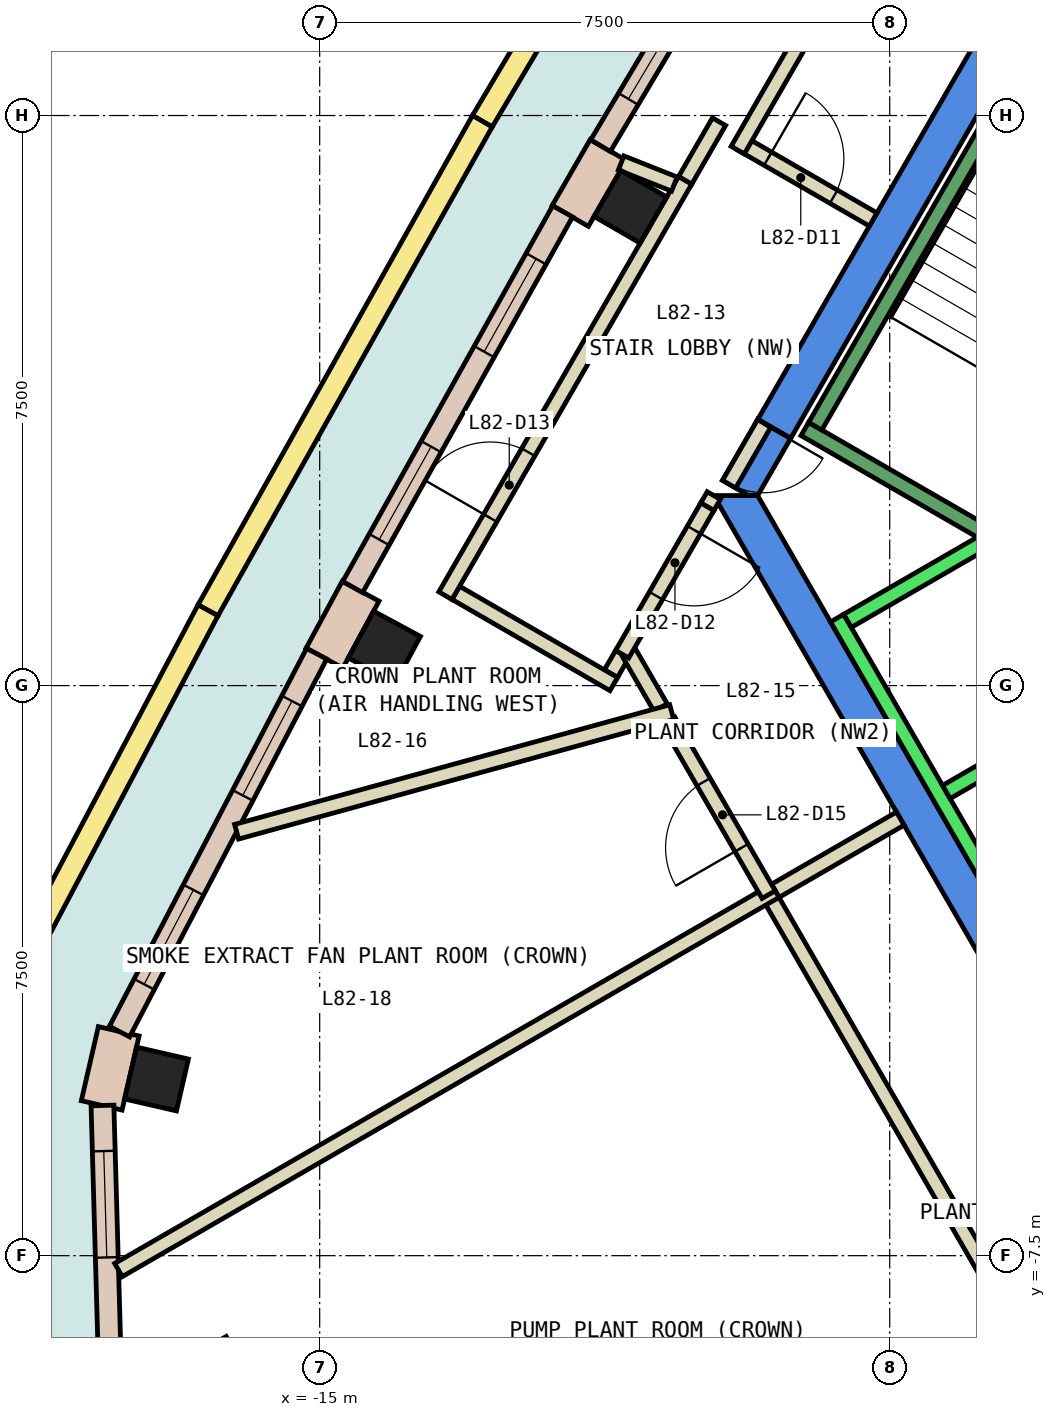
"""IFC4 building model, lengths in metres.
Left out: names, types, materials, properties, quantities, classifications, styles, units other than length and angle.
Written with IfcOpenShell. Run it as: python <this file> out.ifc"""

import sys

from ifc_helpers import new_model, si_unit, direction, frame, frame_2d, origin, origin_2d, place, context, subcontext, project, spatial, polyline, rectangle, outline, extrude, element, fill, save


model = new_model("IFC4")
c1 = context("Model", 3, precision=1e-05, world=origin(), true_north=direction((0.0, 1.0)))
c2 = subcontext(c1, "Body", "Model", "MODEL_VIEW")
j1 = project(units=[si_unit("LENGTHUNIT", "METRE"), si_unit("PLANEANGLEUNIT", "RADIAN")], contexts=[c1])
p1 = place(None, origin())
s1 = spatial("IfcSite", under=j1, at=p1, CompositionType="ELEMENT")
p2 = place(p1, origin())
s2 = spatial("IfcBuilding", under=s1, at=p2, CompositionType="ELEMENT")
p3 = place(p2, frame((0.0, 0.0, 349.4)))
s3 = spatial("IfcBuildingStorey", under=s2, at=p3, CompositionType="ELEMENT", Elevation=349.4)
for number, where, z_axis, x_axis in (
    (1, (-10.912, 6.3, 0.0), (0.0, 0.0, 1.0), (0.5, 0.866, 0.0)),
    (2, (-14.149, 0.505, 0.0), (0.0, 0.0, 1.0), (0.475, 0.88, 0.0)),
    (3, (-17.147, -5.176, 0.0), (0.0, 0.0, 1.0), (0.224, 0.974, 0.0)),
):
    element("IfcColumn", number, at=place(p3, frame(where, z_axis=z_axis, x_axis=x_axis)), inside=s3, PredefinedType="COLUMN", context=c2, shape_type="SweptSolid", body=[
        extrude(rectangle(XDim=0.7, YDim=0.7, at=origin_2d()), origin(), (0.0, 0.0, 1.0), 4.15),
    ])
p4 = place(p3, frame((-16.486, -9.519, 0.0), z_axis=(0.0, 0.0, 1.0), x_axis=(0.866025403784, 0.5, 0.0)))
e4 = element("IfcColumn", 4, at=p4, inside=s3, PredefinedType="COLUMN", context=c2, shape_type="SweptSolid", body=[
    extrude(rectangle(XDim=1.4, YDim=1.4, at=origin_2d()), origin(), (0.0, 0.0, 1.0), 4.15),
])
p5 = place(p3, frame((0.0, 0.0, -0.45)))
e5 = element("IfcWall", 5, at=p5, inside=s3, PredefinedType="SHEAR", context=c2, shape_type="SweptSolid", body=[
    extrude(outline(polyline([(-9.236, 3.502), (-8.803, 3.253), (-4.619, 10.5), (-4.907, 11.0), (-9.236, 3.502)])), origin(), (0.0, 0.0, 1.0), 4.6),
])
p6 = place(p3, frame((0.0, 0.0, 3.6)))
e6 = element("IfcWall", 6, at=p6, inside=s3, PredefinedType="SHEAR", context=c2, shape_type="SweptSolid", body=[
    extrude(outline(polyline([(-9.7, 2.7), (-9.354, 2.5), (-9.238, 2.5), (-8.803, 3.253), (-9.236, 3.502), (-9.7, 2.7)])), origin(), (0.0, 0.0, 1.0), 0.55),
])
p7 = place(p3, frame((0.0, 0.0, -0.45)))
e7 = element("IfcWall", 7, at=p7, inside=s3, PredefinedType="SHEAR", context=c2, shape_type="SweptSolid", body=[
    extrude(outline(polyline([(-9.815, 2.5), (-4.907, -6.0), (-4.619, -5.5), (-9.238, 2.5), (-9.815, 2.5)])), origin(), (0.0, 0.0, 1.0), 4.6),
])
p8 = place(p3, frame((-11.203, 7.046, 0.0), z_axis=(0.0, 0.0, 1.0), x_axis=(-0.49960277677, -0.866254619292, 0.0)))
e8 = element("IfcWall", 8, at=p8, inside=s3, PredefinedType="STANDARD", context=c2, shape_type="SweptSolid", body=[
    extrude(rectangle(XDim=1.001, YDim=0.55, at=frame_2d((0.5, 0.0))), origin(), (0.0, 0.0, 1.0), 4.15),
])
p9 = place(p3, frame((-14.461, 1.242, 0.0), z_axis=(0.0, 0.0, 1.0), x_axis=(-0.475874292304, -0.879513307417, 0.0)))
e9 = element("IfcWall", 9, at=p9, inside=s3, PredefinedType="STANDARD", context=c2, shape_type="SweptSolid", body=[
    extrude(rectangle(XDim=1.0, YDim=0.55, at=frame_2d((0.5, 0.0))), origin(), (0.0, 0.0, 1.0), 4.15),
])
p10 = place(p3, frame((-17.644, -4.548, 0.0), z_axis=(0.0, 0.0, 1.0), x_axis=(-0.223825449309, -0.974629246556, 0.0)))
e10 = element("IfcWall", 10, at=p10, inside=s3, PredefinedType="STANDARD", context=c2, shape_type="SweptSolid", body=[
    extrude(rectangle(XDim=1.0, YDim=0.55, at=frame_2d((0.5, 0.0))), origin(), (0.0, 0.0, 1.0), 4.15),
])
p11 = place(p3, frame((-8.406, 11.966, 0.0), z_axis=(0.0, 0.0, 1.0), x_axis=(-0.512115331419, -0.858916694055, 0.0)))
e11 = element("IfcWall", 11, at=p11, inside=s3, PredefinedType="STANDARD", context=c2, shape_type="SweptSolid", body=[
    extrude(rectangle(XDim=5.661, YDim=0.3, at=frame_2d((2.83, 0.0))), origin(), (0.0, 0.0, 1.0), 4.15),
])
p12 = place(p11, frame((0.415, 0.0, 0.0)))
e12 = element("IfcOpeningElement", 12, at=p12, cuts=e11, PredefinedType="OPENING", context=c2, shape_type="SweptSolid", body=[
    extrude(rectangle(XDim=2.0, YDim=2.4, at=frame_2d((1.0, 1.2))), frame((0.0, 0.16, 0.0), z_axis=(0.0, -1.0, 0.0), x_axis=(1.0, 0.0, 0.0)), (0.0, 0.0, 1.0), 0.32),
])
p13 = place(p11, frame((3.546, 0.0, 0.9)))
e13 = element("IfcOpeningElement", 13, at=p13, cuts=e11, PredefinedType="OPENING", context=c2, shape_type="SweptSolid", body=[
    extrude(rectangle(XDim=1.4, YDim=3.0, at=frame_2d((0.7, 1.5))), frame((0.0, 0.16, 0.0), z_axis=(0.0, -1.0, 0.0), x_axis=(1.0, 0.0, 0.0)), (0.0, 0.0, 1.0), 0.32),
])
p14 = place(p3, frame((-11.804, 6.239, 0.0), z_axis=(0.0, 0.0, 1.0), x_axis=(-0.487863884296, -0.872919715896, 0.0)))
e14 = element("IfcWall", 14, at=p14, inside=s3, PredefinedType="STANDARD", context=c2, shape_type="SweptSolid", body=[
    extrude(rectangle(XDim=5.661, YDim=0.3, at=frame_2d((2.831, 0.0))), origin(), (0.0, 0.0, 1.0), 4.15),
])
p15 = place(p14, frame((0.715, 0.0, 0.9)))
e15 = element("IfcOpeningElement", 15, at=p15, cuts=e14, PredefinedType="OPENING", context=c2, shape_type="SweptSolid", body=[
    extrude(rectangle(XDim=1.4, YDim=3.0, at=frame_2d((0.7, 1.5))), frame((0.0, 0.16, 0.0), z_axis=(0.0, -1.0, 0.0), x_axis=(1.0, 0.0, 0.0)), (0.0, 0.0, 1.0), 0.32),
])
p16 = place(p14, frame((3.546, 0.0, 0.9)))
e16 = element("IfcOpeningElement", 16, at=p16, cuts=e14, PredefinedType="OPENING", context=c2, shape_type="SweptSolid", body=[
    extrude(rectangle(XDim=1.4, YDim=3.0, at=frame_2d((0.7, 1.5))), frame((0.0, 0.16, 0.0), z_axis=(0.0, -1.0, 0.0), x_axis=(1.0, 0.0, 0.0)), (0.0, 0.0, 1.0), 0.32),
])
p17 = place(p3, frame((-15.04, 0.419, 0.0), z_axis=(0.0, 0.0, 1.0), x_axis=(-0.462629991654, -0.886551459771, 0.0)))
e17 = element("IfcWall", 17, at=p17, inside=s3, PredefinedType="STANDARD", context=c2, shape_type="SweptSolid", body=[
    extrude(rectangle(XDim=5.607, YDim=0.3, at=frame_2d((2.804, 0.0))), origin(), (0.0, 0.0, 1.0), 4.15),
])
p18 = place(p17, frame((0.702, 0.0, 0.9)))
e18 = element("IfcOpeningElement", 18, at=p18, cuts=e17, PredefinedType="OPENING", context=c2, shape_type="SweptSolid", body=[
    extrude(rectangle(XDim=1.4, YDim=3.0, at=frame_2d((0.7, 1.5))), frame((0.0, 0.16, 0.0), z_axis=(0.0, -1.0, 0.0), x_axis=(1.0, 0.0, 0.0)), (0.0, 0.0, 1.0), 0.32),
])
p19 = place(p17, frame((3.505, 0.0, 0.9)))
e19 = element("IfcOpeningElement", 19, at=p19, cuts=e17, PredefinedType="OPENING", context=c2, shape_type="SweptSolid", body=[
    extrude(rectangle(XDim=1.4, YDim=3.0, at=frame_2d((0.7, 1.5))), frame((0.0, 0.16, 0.0), z_axis=(0.0, -1.0, 0.0), x_axis=(1.0, 0.0, 0.0)), (0.0, 0.0, 1.0), 0.32),
])
p20 = place(p3, frame((-17.858, -5.524, 0.0), z_axis=(0.0, 0.0, 1.0), x_axis=(0.028453984805, -0.999595103404, 0.0)))
e20 = element("IfcWall", 20, at=p20, inside=s3, PredefinedType="STANDARD", context=c2, shape_type="SweptSolid", body=[
    extrude(rectangle(XDim=3.689, YDim=0.3, at=frame_2d((1.845, 0.0))), origin(), (0.0, 0.0, 1.0), 4.15),
])
p21 = place(p20, frame((0.6, 0.0, 0.9)))
e21 = element("IfcOpeningElement", 21, at=p21, cuts=e20, PredefinedType="OPENING", context=c2, shape_type="SweptSolid", body=[
    extrude(rectangle(XDim=1.4, YDim=3.0, at=frame_2d((0.7, 1.5))), frame((0.0, 0.16, 0.0), z_axis=(0.0, -1.0, 0.0), x_axis=(1.0, 0.0, 0.0)), (0.0, 0.0, 1.0), 0.32),
])
p22 = place(p3, origin())
e22 = element("IfcWall", 22, at=p22, inside=s3, PredefinedType="PARAPET", context=c2, shape_type="SweptSolid", body=[
    extrude(outline(polyline([(-9.22, 13.846), (-12.99, 7.5), (-12.73, 7.35), (-8.964, 13.69), (-9.22, 13.846)])), origin(), (0.0, 0.0, 1.0), 1.1),
])
p23 = place(p3, origin())
e23 = element("IfcWall", 23, at=p23, inside=s3, PredefinedType="PARAPET", context=c2, shape_type="SweptSolid", body=[
    extrude(outline(polyline([(-12.99, 7.5), (-16.601, 1.062), (-16.338, 0.919), (-12.73, 7.35), (-12.99, 7.5)])), origin(), (0.0, 0.0, 1.0), 1.1),
])
p24 = place(p3, origin())
e24 = element("IfcWall", 24, at=p24, inside=s3, PredefinedType="PARAPET", context=c2, shape_type="SweptSolid", body=[
    extrude(outline(polyline([(-16.601, 1.062), (-20.049, -5.465), (-19.747, -5.536), (-16.338, 0.919), (-16.601, 1.062)])), origin(), (0.0, 0.0, 1.0), 1.1),
])
p25 = place(p3, frame((-6.112, -7.913, 0.0), z_axis=(0.0, 0.0, 1.0), x_axis=(-0.500006035293, 0.866021919278, 0.0)))
e25 = element("IfcWall", 25, at=p25, inside=s3, PredefinedType="PARTITIONING", context=c2, shape_type="SweptSolid", body=[
    extrude(rectangle(XDim=5.962, YDim=0.2, at=frame_2d((2.981, 0.0))), origin(), (0.0, 0.0, 1.0), 4.15),
])
p26 = place(p3, frame((-9.006, -2.7, 0.0), z_axis=(0.0, 0.0, 1.0), x_axis=(0.865980106173, 0.500078449558, 0.0)))
e26 = element("IfcWall", 26, at=p26, inside=s3, PredefinedType="PARTITIONING", context=c2, shape_type="SweptSolid", body=[
    extrude(rectangle(XDim=1.9, YDim=0.2, at=frame_2d((0.95, 0.0))), origin(), (0.0, 0.0, 1.0), 4.15),
])
p27 = place(p3, frame((-17.647, -7.689, 0.0), z_axis=(0.0, 0.0, 1.0), x_axis=(0.866016483303, 0.500015450408, 0.0)))
e27 = element("IfcWall", 27, at=p27, inside=s3, PredefinedType="PARTITIONING", context=c2, shape_type="SweptSolid", body=[
    extrude(rectangle(XDim=9.978, YDim=0.2, at=frame_2d((4.989, 0.0))), origin(), (0.0, 0.0, 1.0), 4.15),
])
p28 = place(p3, frame((-9.45, 7.132, 0.0), z_axis=(0.0, 0.0, 1.0), x_axis=(0.866010750942, -0.50002537861, 0.0)))
e28 = element("IfcWall", 28, at=p28, inside=s3, PredefinedType="PARTITIONING", context=c2, shape_type="SweptSolid", body=[
    extrude(rectangle(XDim=2.0, YDim=0.2, at=frame_2d((1.0, 0.0))), origin(), (0.0, 0.0, 1.0), 4.15),
])
p29 = place(p28, frame((0.4, 0.0, 0.0)))
e29 = element("IfcOpeningElement", 29, at=p29, cuts=e28, PredefinedType="OPENING", context=c2, shape_type="SweptSolid", body=[
    extrude(rectangle(XDim=1.0, YDim=2.1, at=frame_2d((0.5, 1.05))), frame((0.0, 0.11, 0.0), z_axis=(0.0, -1.0, 0.0), x_axis=(1.0, 0.0, 0.0)), (0.0, 0.0, 1.0), 0.22),
])
p30 = place(p3, frame((-9.815, 2.5, 0.0), z_axis=(0.0, 0.0, 1.0), x_axis=(-0.5004692653, -0.865754303766, 0.0)))
e30 = element("IfcWall", 30, at=p30, inside=s3, PredefinedType="PARTITIONING", context=c2, shape_type="SweptSolid", body=[
    extrude(rectangle(XDim=0.17, YDim=0.2, at=frame_2d((0.085, 0.0))), origin(), (0.0, 0.0, 1.0), 2.4),
])
p31 = place(p3, frame((-11.02, 0.413, 0.0), z_axis=(0.0, 0.0, 1.0), x_axis=(-0.500222587251, -0.865896854829, 0.0)))
e31 = element("IfcWall", 31, at=p31, inside=s3, PredefinedType="PARTITIONING", context=c2, shape_type="SweptSolid", body=[
    extrude(rectangle(XDim=0.296, YDim=0.2, at=frame_2d((0.148, 0.0))), origin(), (0.0, 0.0, 1.0), 4.15),
])
p32 = place(p3, frame((-11.131, 0.02, 0.0), z_axis=(0.0, 0.0, 1.0), x_axis=(-0.865973769406, 0.500089422704, 0.0)))
e32 = element("IfcWall", 32, at=p32, inside=s3, PredefinedType="PARTITIONING", context=c2, shape_type="SweptSolid", body=[
    extrude(rectangle(XDim=2.399, YDim=0.2, at=frame_2d((1.2, 0.0))), origin(), (0.0, 0.0, 1.0), 4.15),
])
p33 = place(p3, frame((-13.346, 1.183, 0.0), z_axis=(0.0, 0.0, 1.0), x_axis=(0.49998814853, 0.866032246126, 0.0)))
e33 = element("IfcWall", 33, at=p33, inside=s3, PredefinedType="PARTITIONING", context=c2, shape_type="SweptSolid", body=[
    extrude(rectangle(XDim=6.31, YDim=0.2, at=frame_2d((3.155, 0.0))), origin(), (0.0, 0.0, 1.0), 4.15),
])
p34 = place(p33, frame((1.18, 0.0, 0.0)))
e34 = element("IfcOpeningElement", 34, at=p34, cuts=e33, PredefinedType="OPENING", context=c2, shape_type="SweptSolid", body=[
    extrude(rectangle(XDim=1.0, YDim=2.1, at=frame_2d((0.5, 1.05))), frame((0.0, 0.11, 0.0), z_axis=(0.0, -1.0, 0.0), x_axis=(1.0, 0.0, 0.0)), (0.0, 0.0, 1.0), 0.22),
])
p35 = place(p3, frame((-10.191, 6.648, 0.0), z_axis=(0.0, 0.0, 1.0), x_axis=(0.49973828311, 0.866176453382, 0.0)))
e35 = element("IfcWall", 35, at=p35, inside=s3, PredefinedType="PARTITIONING", context=c2, shape_type="SweptSolid", body=[
    extrude(rectangle(XDim=0.89, YDim=0.2, at=frame_2d((0.445, 0.0))), origin(), (0.0, 0.0, 1.0), 4.15),
])
p36 = place(p3, frame((-9.5, 7.045, 0.0), z_axis=(0.0, 0.0, 1.0), x_axis=(0.499966812698, 0.866044563634, 0.0)))
e36 = element("IfcWall", 36, at=p36, inside=s3, PredefinedType="PARTITIONING", context=c2, shape_type="SweptSolid", body=[
    extrude(rectangle(XDim=6.977, YDim=0.2, at=frame_2d((3.488, 0.0))), origin(), (0.0, 0.0, 1.0), 4.15),
])
p37 = place(p3, frame((-10.514, -0.289, 0.0), z_axis=(0.0, 0.0, 1.0), x_axis=(-0.500402557727, 0.865792862191, 0.0)))
e37 = element("IfcWall", 37, at=p37, inside=s3, PredefinedType="PARTITIONING", context=c2, shape_type="SweptSolid", body=[
    extrude(rectangle(XDim=0.911, YDim=0.2, at=frame_2d((0.456, 0.0))), origin(), (0.0, 0.0, 1.0), 4.15),
])
p38 = place(p3, frame((-9.093, -2.75, 0.0), z_axis=(0.0, 0.0, 1.0), x_axis=(-0.50016517285, 0.865930020191, 0.0)))
e38 = element("IfcWall", 38, at=p38, inside=s3, PredefinedType="PARTITIONING", context=c2, shape_type="SweptSolid", body=[
    extrude(rectangle(XDim=2.641, YDim=0.2, at=frame_2d((1.321, 0.0))), origin(), (0.0, 0.0, 1.0), 4.15),
])
p39 = place(p38, frame((0.712, 0.0, 0.0)))
e39 = element("IfcOpeningElement", 39, at=p39, cuts=e38, PredefinedType="OPENING", context=c2, shape_type="SweptSolid", body=[
    extrude(rectangle(XDim=1.0, YDim=2.1, at=frame_2d((0.5, 1.05))), frame((0.0, 0.11, 0.0), z_axis=(0.0, -1.0, 0.0), x_axis=(1.0, 0.0, 0.0)), (0.0, 0.0, 1.0), 0.22),
])
p40 = place(p3, frame((-11.034, 6.876, 0.0), z_axis=(0.0, 0.0, 1.0), x_axis=(0.929345991637, -0.369210005049, 0.0)))
e40 = element("IfcWall", 40, at=p40, inside=s3, PredefinedType="PARTITIONING", context=c2, shape_type="SweptSolid", body=[
    extrude(rectangle(XDim=0.753, YDim=0.2, at=frame_2d((0.376, 0.0))), origin(), (0.0, 0.0, 1.0), 4.15),
])
p41 = place(p3, frame((-10.368, -0.349, 0.0), z_axis=(0.0, 0.0, 1.0), x_axis=(-0.964223787392, -0.265089584534, 0.0)))
e41 = element("IfcWall", 41, at=p41, inside=s3, PredefinedType="PARTITIONING", context=c2, shape_type="SweptSolid", body=[
    extrude(rectangle(XDim=5.938, YDim=0.2, at=frame_2d((2.969, 0.0))), origin(), (0.0, 0.0, 1.0), 4.15),
])
p42 = place(p3, frame((-9.15, 3.452, 0.0), z_axis=(0.0, 0.0, 1.0), x_axis=(-0.500079945886, -0.865979242085, 0.0)))
e42 = element("IfcWall", 42, at=p42, inside=s3, PredefinedType="PARTITIONING", context=c2, shape_type="SweptSolid", body=[
    extrude(rectangle(XDim=0.926, YDim=0.2, at=frame_2d((0.463, 0.0))), origin(), (0.0, 0.0, 1.0), 2.4),
])
p43 = place(p42, frame((0.017, 0.0, 0.0)))
e43 = element("IfcOpeningElement", 43, at=p43, cuts=e42, PredefinedType="OPENING", context=c2, shape_type="SweptSolid", body=[
    extrude(rectangle(XDim=0.9, YDim=2.1, at=frame_2d((0.45, 1.05))), frame((0.0, 0.11, 0.0), z_axis=(0.0, -1.0, 0.0), x_axis=(1.0, 0.0, 0.0)), (0.0, 0.0, 1.0), 0.22),
])
p44 = place(p3, frame((-9.9, 2.353, 0.0), z_axis=(0.0, 0.0, 1.0), x_axis=(-0.500030632641, -0.866007717299, 0.0)))
e44 = element("IfcWall", 44, at=p44, inside=s3, PredefinedType="PARTITIONING", context=c2, shape_type="SweptSolid", body=[
    extrude(rectangle(XDim=2.24, YDim=0.2, at=frame_2d((1.12, 0.0))), origin(), (0.0, 0.0, 1.0), 4.15),
])
p45 = place(p44, frame((0.351, 0.0, 0.0)))
e45 = element("IfcOpeningElement", 45, at=p45, cuts=e44, PredefinedType="OPENING", context=c2, shape_type="SweptSolid", body=[
    extrude(rectangle(XDim=1.0, YDim=2.1, at=frame_2d((0.5, 1.05))), frame((0.0, 0.11, 0.0), z_axis=(0.0, -1.0, 0.0), x_axis=(1.0, 0.0, 0.0)), (0.0, 0.0, 1.0), 0.22),
])
p46 = place(p3, frame((-8.192, 0.888, 0.0), z_axis=(0.0, 0.0, 1.0), x_axis=(0.500034260056, -0.866005622828, 0.0)))
e46 = element("IfcWall", 46, at=p46, inside=s3, PredefinedType="STANDARD", context=c2, shape_type="SweptSolid", body=[
    extrude(rectangle(XDim=5.399, YDim=0.2, at=frame_2d((2.7, 0.0))), origin(), (0.0, 0.0, 1.0), 4.15),
])
for number, where, z_axis, x_axis in (
    (47, (-5.977, 2.052, 0.0), (0.0, 0.0, 1.0), (-0.866, -0.5, 0.0)),
    (48, (-4.677, -0.2, 0.0), (0.0, 0.0, 1.0), (-0.866, -0.5, 0.0)),
):
    element("IfcWall", number, at=place(p3, frame(where, z_axis=z_axis, x_axis=x_axis)), inside=s3, PredefinedType="STANDARD", context=c2, shape_type="SweptSolid", body=[
        extrude(rectangle(XDim=2.399, YDim=0.2, at=frame_2d((1.2, 0.0))), origin(), (0.0, 0.0, 1.0), 4.15),
    ])
p47 = place(p3, frame((-6.25, 2.01, 0.0), z_axis=(0.0, 0.0, 1.0), x_axis=(-0.86611865017, 0.499838457731, 0.0)))
e49 = element("IfcWall", 49, at=p47, inside=s3, PredefinedType="STANDARD", context=c2, shape_type="SweptSolid", body=[
    extrude(rectangle(XDim=2.733, YDim=0.2, at=frame_2d((1.366, 0.0))), origin(), (0.0, 0.0, 1.0), 4.15),
])
p48 = place(p3, frame((-5.03, 9.388, 0.0), z_axis=(0.0, 0.0, 1.0), x_axis=(-0.499978703459, -0.866037698999, 0.0)))
e50 = element("IfcWall", 50, at=p48, inside=s3, PredefinedType="STANDARD", context=c2, shape_type="SweptSolid", body=[
    extrude(rectangle(XDim=6.9, YDim=0.2, at=frame_2d((3.45, 0.0))), origin(), (0.0, 0.0, 1.0), 4.15),
])
p49 = place(p13, origin())
e51 = element("IfcWindow", 51, at=p49, inside=s3, PartitioningType="SINGLE_PANEL", PredefinedType="WINDOW", context=c2, shape_type="SweptSolid", body=[
    extrude(rectangle(XDim=1.4, YDim=3.0, at=frame_2d((0.7, 1.5))), frame((0.0, 0.03, 0.0), z_axis=(0.0, -1.0, 0.0), x_axis=(1.0, 0.0, 0.0)), (0.0, 0.0, 1.0), 0.06),
])
fill(e13, e51)
p50 = place(p15, origin())
e52 = element("IfcWindow", 52, at=p50, inside=s3, PartitioningType="SINGLE_PANEL", PredefinedType="WINDOW", context=c2, shape_type="SweptSolid", body=[
    extrude(rectangle(XDim=1.4, YDim=3.0, at=frame_2d((0.7, 1.5))), frame((0.0, 0.03, 0.0), z_axis=(0.0, -1.0, 0.0), x_axis=(1.0, 0.0, 0.0)), (0.0, 0.0, 1.0), 0.06),
])
fill(e15, e52)
p51 = place(p16, origin())
e53 = element("IfcWindow", 53, at=p51, inside=s3, PartitioningType="SINGLE_PANEL", PredefinedType="WINDOW", context=c2, shape_type="SweptSolid", body=[
    extrude(rectangle(XDim=1.4, YDim=3.0, at=frame_2d((0.7, 1.5))), frame((0.0, 0.03, 0.0), z_axis=(0.0, -1.0, 0.0), x_axis=(1.0, 0.0, 0.0)), (0.0, 0.0, 1.0), 0.06),
])
fill(e16, e53)
p52 = place(p18, origin())
e54 = element("IfcWindow", 54, at=p52, inside=s3, PartitioningType="SINGLE_PANEL", PredefinedType="WINDOW", context=c2, shape_type="SweptSolid", body=[
    extrude(rectangle(XDim=1.4, YDim=3.0, at=frame_2d((0.7, 1.5))), frame((0.0, 0.03, 0.0), z_axis=(0.0, -1.0, 0.0), x_axis=(1.0, 0.0, 0.0)), (0.0, 0.0, 1.0), 0.06),
])
fill(e18, e54)
p53 = place(p19, origin())
e55 = element("IfcWindow", 55, at=p53, inside=s3, PartitioningType="SINGLE_PANEL", PredefinedType="WINDOW", context=c2, shape_type="SweptSolid", body=[
    extrude(rectangle(XDim=1.4, YDim=3.0, at=frame_2d((0.7, 1.5))), frame((0.0, 0.03, 0.0), z_axis=(0.0, -1.0, 0.0), x_axis=(1.0, 0.0, 0.0)), (0.0, 0.0, 1.0), 0.06),
])
fill(e19, e55)
p54 = place(p21, origin())
e56 = element("IfcWindow", 56, at=p54, inside=s3, PartitioningType="SINGLE_PANEL", PredefinedType="WINDOW", context=c2, shape_type="SweptSolid", body=[
    extrude(rectangle(XDim=1.4, YDim=3.0, at=frame_2d((0.7, 1.5))), frame((0.0, 0.03, 0.0), z_axis=(0.0, -1.0, 0.0), x_axis=(1.0, 0.0, 0.0)), (0.0, 0.0, 1.0), 0.06),
])
fill(e21, e56)
p55 = place(p29, origin())
e57 = element("IfcDoor", 57, at=p55, inside=s3, OperationType="SINGLE_SWING_LEFT", PredefinedType="DOOR", context=c2, shape_type="SweptSolid", body=[
    extrude(rectangle(XDim=1.0, YDim=2.1, at=frame_2d((0.5, 1.05))), frame((0.0, 0.025, 0.0), z_axis=(0.0, -1.0, 0.0), x_axis=(1.0, 0.0, 0.0)), (0.0, 0.0, 1.0), 0.05),
])
fill(e29, e57)
p56 = place(p45, origin())
e58 = element("IfcDoor", 58, at=p56, inside=s3, OperationType="SINGLE_SWING_RIGHT", PredefinedType="DOOR", context=c2, shape_type="SweptSolid", body=[
    extrude(rectangle(XDim=1.0, YDim=2.1, at=frame_2d((0.5, 1.05))), frame((0.0, 0.025, 0.0), z_axis=(0.0, -1.0, 0.0), x_axis=(1.0, 0.0, 0.0)), (0.0, 0.0, 1.0), 0.05),
])
fill(e45, e58)
p57 = place(p34, origin())
e59 = element("IfcDoor", 59, at=p57, inside=s3, OperationType="SINGLE_SWING_LEFT", PredefinedType="DOOR", context=c2, shape_type="SweptSolid", body=[
    extrude(rectangle(XDim=1.0, YDim=2.1, at=frame_2d((0.5, 1.05))), frame((0.0, 0.025, 0.0), z_axis=(0.0, -1.0, 0.0), x_axis=(1.0, 0.0, 0.0)), (0.0, 0.0, 1.0), 0.05),
])
fill(e34, e59)
p58 = place(p39, origin())
e60 = element("IfcDoor", 60, at=p58, inside=s3, OperationType="SINGLE_SWING_LEFT", PredefinedType="DOOR", context=c2, shape_type="SweptSolid", body=[
    extrude(rectangle(XDim=1.0, YDim=2.1, at=frame_2d((0.5, 1.05))), frame((0.0, 0.025, 0.0), z_axis=(0.0, -1.0, 0.0), x_axis=(1.0, 0.0, 0.0)), (0.0, 0.0, 1.0), 0.05),
])
fill(e39, e60)
p59 = place(p43, origin())
e61 = element("IfcDoor", 61, at=p59, inside=s3, OperationType="SINGLE_SWING_LEFT", PredefinedType="DOOR", context=c2, shape_type="SweptSolid", body=[
    extrude(rectangle(XDim=0.9, YDim=2.1, at=frame_2d((0.45, 1.05))), frame((0.0, 0.025, 0.0), z_axis=(0.0, -1.0, 0.0), x_axis=(1.0, 0.0, 0.0)), (0.0, 0.0, 1.0), 0.05),
])
fill(e43, e61)
save(model, sys.argv[1])
